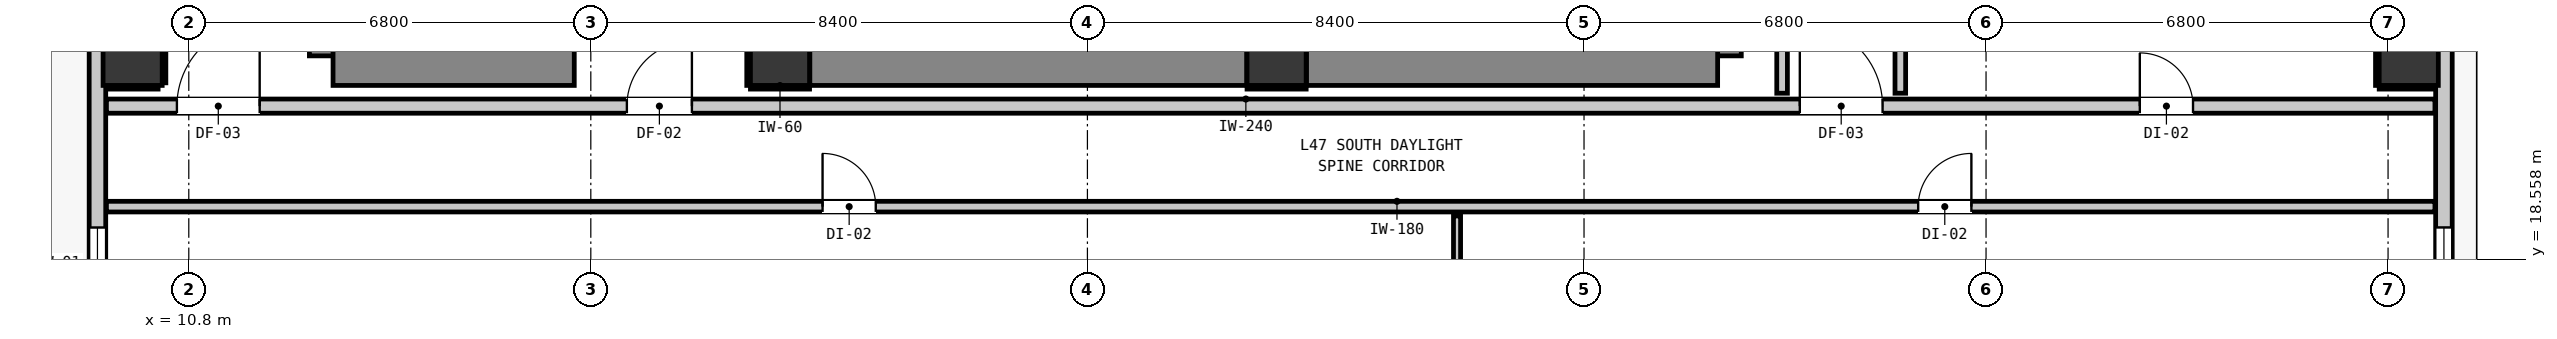
"""IFC4 building model, lengths in metres.
Left out: names, types, materials, properties, quantities, classifications, styles, units other than length and angle.
Written with IfcOpenShell. Run it as: python <this file> out.ifc"""

import sys

from ifc_helpers import new_model, si_unit, direction, frame, frame_2d, origin, origin_2d, place, context, subcontext, project, spatial, rectangle, extrude, element, fill, save


model = new_model("IFC4")
c1 = context("Model", 3, precision=1e-05, world=origin(), true_north=direction((0.0, 1.0)))
c2 = subcontext(c1, "Body", "Model", "MODEL_VIEW")
j1 = project(units=[si_unit("LENGTHUNIT", "METRE"), si_unit("PLANEANGLEUNIT", "RADIAN")], contexts=[c1])
p1 = place(None, origin())
s1 = spatial("IfcSite", under=j1, at=p1, CompositionType="ELEMENT")
p2 = place(p1, origin())
s2 = spatial("IfcBuilding", under=s1, at=p2, CompositionType="ELEMENT")
p3 = place(p2, frame((0.0, 0.0, 162.52)))
s3 = spatial("IfcBuildingStorey", under=s2, at=p3, CompositionType="ELEMENT", Elevation=162.52)
for number, where, z_axis, x_axis in (
    (1, (20.8, 22.0, 0.0), (0.0, 0.0, 1.0), (1.0, 0.0, 0.0)),
    (2, (29.2, 22.0, 0.0), (0.0, 0.0, 1.0), (1.0, 0.0, 0.0)),
):
    element("IfcColumn", number, at=place(p3, frame(where, z_axis=z_axis, x_axis=x_axis)), inside=s3, PredefinedType="COLUMN", context=c2, shape_type="SweptSolid", body=[
        extrude(rectangle(XDim=1.0, YDim=1.0, at=origin_2d()), origin(), (0.0, 0.0, 1.0), 3.32),
    ])
p4 = place(p3, frame((13.34, 22.0, 0.0), z_axis=(0.0, 0.0, 1.0), x_axis=(0.0, 1.0, 0.0)))
e3 = element("IfcWall", 3, at=p4, inside=s3, PredefinedType="SHEAR", context=c2, shape_type="SweptSolid", body=[
    extrude(rectangle(XDim=8.195, YDim=1.0, at=frame_2d((4.098, 0.0))), origin(), (0.0, 0.0, 1.0), 3.32),
])
p5 = place(p3, frame((13.24, 22.0, 0.0), z_axis=(0.0, 0.0, 1.0), x_axis=(1.0, 0.0, 0.0)))
e4 = element("IfcWall", 4, at=p5, inside=s3, PredefinedType="SHEAR", context=c2, shape_type="SweptSolid", body=[
    extrude(rectangle(XDim=4.08, YDim=1.0, at=frame_2d((2.04, 0.0))), origin(), (0.0, 0.0, 1.0), 3.32),
])
p6 = place(p3, frame((36.56, 22.0, 0.0), z_axis=(0.0, 0.0, 1.0), x_axis=(0.0, 1.0, 0.0)))
e5 = element("IfcWall", 5, at=p6, inside=s3, PredefinedType="SHEAR", context=c2, shape_type="SweptSolid", body=[
    extrude(rectangle(XDim=8.195, YDim=1.0, at=frame_2d((4.098, 0.0))), origin(), (0.0, 0.0, 1.0), 3.32),
])
p7 = place(p3, frame((29.705, 22.0, 0.0), z_axis=(0.0, 0.0, 1.0), x_axis=(1.0, 0.0, 0.0)))
e6 = element("IfcWall", 6, at=p7, inside=s3, PredefinedType="SHEAR", context=c2, shape_type="SweptSolid", body=[
    extrude(rectangle(XDim=6.955, YDim=1.0, at=frame_2d((3.478, 0.0))), origin(), (0.0, 0.0, 1.0), 3.32),
])
p8 = place(p3, frame((21.305, 22.0, 0.0), z_axis=(0.0, 0.0, 1.0), x_axis=(1.0, 0.0, 0.0)))
e7 = element("IfcWall", 7, at=p8, inside=s3, PredefinedType="SHEAR", context=c2, shape_type="SweptSolid", body=[
    extrude(rectangle(XDim=7.39, YDim=1.0, at=frame_2d((3.695, 0.0))), origin(), (0.0, 0.0, 1.0), 3.32),
])
for number, where, z_axis, x_axis in (
    (8, (9.85, 22.0, 0.0), (0.0, 0.0, 1.0), (1.0, 0.0, 0.0)),
    (9, (48.35, 22.0, 0.0), (0.0, 0.0, 1.0), (1.0, 0.0, 0.0)),
):
    element("IfcColumn", number, at=place(p3, frame(where, z_axis=z_axis, x_axis=x_axis)), inside=s3, PredefinedType="COLUMN", context=c2, shape_type="SweptSolid", body=[
        extrude(rectangle(XDim=1.0, YDim=1.0, at=origin_2d()), origin(), (0.0, 0.0, 1.0), 2.9),
    ])
p9 = place(p3, frame((9.255, 17.555, 0.0), z_axis=(0.0, 0.0, 1.0), x_axis=(0.0, 1.0, 0.0)))
e10 = element("IfcWall", 10, at=p9, inside=s3, PredefinedType="STANDARD", context=c2, shape_type="SweptSolid", body=[
    extrude(rectangle(XDim=32.29, YDim=0.28, at=frame_2d((16.145, 0.0))), origin(), (0.0, 0.0, 1.0), 2.9),
])
p10 = place(p9, frame((5.467, 0.0, 0.0)))
e11 = element("IfcOpeningElement", 11, at=p10, cuts=e10, PredefinedType="OPENING", context=c2, shape_type="SweptSolid", body=[
    extrude(rectangle(XDim=1.0, YDim=2.15, at=frame_2d((0.5, 1.075))), frame((0.0, 0.15, 0.0), z_axis=(0.0, -1.0, 0.0), x_axis=(1.0, 0.0, 0.0)), (0.0, 0.0, 1.0), 0.3),
])
p11 = place(p9, frame((0.342, 0.0, 0.85)))
e12 = element("IfcOpeningElement", 12, at=p11, cuts=e10, PredefinedType="OPENING", context=c2, shape_type="SweptSolid", body=[
    extrude(rectangle(XDim=1.2, YDim=1.8, at=frame_2d((0.6, 0.9))), frame((0.0, 0.15, 0.0), z_axis=(0.0, -1.0, 0.0), x_axis=(1.0, 0.0, 0.0)), (0.0, 0.0, 1.0), 0.3),
])
p12 = place(p9, frame((30.677, 0.0, 0.85)))
e13 = element("IfcOpeningElement", 13, at=p12, cuts=e10, PredefinedType="OPENING", context=c2, shape_type="SweptSolid", body=[
    extrude(rectangle(XDim=1.2, YDim=1.8, at=frame_2d((0.6, 0.9))), frame((0.0, 0.15, 0.0), z_axis=(0.0, -1.0, 0.0), x_axis=(1.0, 0.0, 0.0)), (0.0, 0.0, 1.0), 0.3),
])
p13 = place(p3, frame((48.945, 49.845, 0.0), z_axis=(0.0, 0.0, 1.0), x_axis=(0.0, -1.0, 0.0)))
e14 = element("IfcWall", 14, at=p13, inside=s3, PredefinedType="STANDARD", context=c2, shape_type="SweptSolid", body=[
    extrude(rectangle(XDim=32.29, YDim=0.28, at=frame_2d((16.145, 0.0))), origin(), (0.0, 0.0, 1.0), 2.9),
])
p14 = place(p13, frame((2.659, 0.0, 0.0)))
e15 = element("IfcOpeningElement", 15, at=p14, cuts=e14, PredefinedType="OPENING", context=c2, shape_type="SweptSolid", body=[
    extrude(rectangle(XDim=1.0, YDim=2.15, at=frame_2d((0.5, 1.075))), frame((0.0, 0.15, 0.0), z_axis=(0.0, -1.0, 0.0), x_axis=(1.0, 0.0, 0.0)), (0.0, 0.0, 1.0), 0.3),
])
p15 = place(p13, frame((30.747, 0.0, 0.85)))
e16 = element("IfcOpeningElement", 16, at=p15, cuts=e14, PredefinedType="OPENING", context=c2, shape_type="SweptSolid", body=[
    extrude(rectangle(XDim=1.2, YDim=1.8, at=frame_2d((0.6, 0.9))), frame((0.0, 0.15, 0.0), z_axis=(0.0, -1.0, 0.0), x_axis=(1.0, 0.0, 0.0)), (0.0, 0.0, 1.0), 0.3),
])
p16 = place(p13, frame((4.027, 0.0, 0.85)))
e17 = element("IfcOpeningElement", 17, at=p16, cuts=e14, PredefinedType="OPENING", context=c2, shape_type="SweptSolid", body=[
    extrude(rectangle(XDim=0.9, YDim=1.5, at=frame_2d((0.45, 0.75))), frame((0.0, 0.15, 0.0), z_axis=(0.0, -1.0, 0.0), x_axis=(1.0, 0.0, 0.0)), (0.0, 0.0, 1.0), 0.3),
])
p17 = place(p13, frame((0.412, 0.0, 0.85)))
e18 = element("IfcOpeningElement", 18, at=p17, cuts=e14, PredefinedType="OPENING", context=c2, shape_type="SweptSolid", body=[
    extrude(rectangle(XDim=1.2, YDim=1.8, at=frame_2d((0.6, 0.9))), frame((0.0, 0.15, 0.0), z_axis=(0.0, -1.0, 0.0), x_axis=(1.0, 0.0, 0.0)), (0.0, 0.0, 1.0), 0.3),
])
p18 = place(p13, frame((22.895, 0.0, 0.85)))
e19 = element("IfcOpeningElement", 19, at=p18, cuts=e14, PredefinedType="OPENING", context=c2, shape_type="SweptSolid", body=[
    extrude(rectangle(XDim=1.2, YDim=1.8, at=frame_2d((0.6, 0.9))), frame((0.0, 0.15, 0.0), z_axis=(0.0, -1.0, 0.0), x_axis=(1.0, 0.0, 0.0)), (0.0, 0.0, 1.0), 0.3),
])
p19 = place(p3, frame((9.407, 21.15, 0.0), z_axis=(0.0, 0.0, 1.0), x_axis=(1.0, 0.0, 0.0)))
e20 = element("IfcWall", 20, at=p19, inside=s3, PredefinedType="PARTITIONING", context=c2, shape_type="SweptSolid", body=[
    extrude(rectangle(XDim=39.386, YDim=0.24, at=frame_2d((19.693, 0.0))), origin(), (0.0, 0.0, 1.0), 2.9),
])
p20 = place(p19, frame((8.803, 0.0, 0.0)))
e21 = element("IfcOpeningElement", 21, at=p20, cuts=e20, PredefinedType="OPENING", context=c2, shape_type="SweptSolid", body=[
    extrude(rectangle(XDim=1.1, YDim=2.15, at=frame_2d((0.55, 1.075))), frame((0.0, 0.13, 0.0), z_axis=(0.0, -1.0, 0.0), x_axis=(1.0, 0.0, 0.0)), (0.0, 0.0, 1.0), 0.26),
])
p21 = place(p19, frame((1.192, 0.0, 0.0)))
e22 = element("IfcOpeningElement", 22, at=p21, cuts=e20, PredefinedType="OPENING", context=c2, shape_type="SweptSolid", body=[
    extrude(rectangle(XDim=1.4, YDim=2.15, at=frame_2d((0.7, 1.075))), frame((0.0, 0.13, 0.0), z_axis=(0.0, -1.0, 0.0), x_axis=(1.0, 0.0, 0.0)), (0.0, 0.0, 1.0), 0.26),
])
p22 = place(p19, frame((28.643, 0.0, 0.0)))
e23 = element("IfcOpeningElement", 23, at=p22, cuts=e20, PredefinedType="OPENING", context=c2, shape_type="SweptSolid", body=[
    extrude(rectangle(XDim=1.4, YDim=2.15, at=frame_2d((0.7, 1.075))), frame((0.0, 0.13, 0.0), z_axis=(0.0, -1.0, 0.0), x_axis=(1.0, 0.0, 0.0)), (0.0, 0.0, 1.0), 0.26),
])
p23 = place(p19, frame((34.394, 0.0, 0.0)))
e24 = element("IfcOpeningElement", 24, at=p23, cuts=e20, PredefinedType="OPENING", context=c2, shape_type="SweptSolid", body=[
    extrude(rectangle(XDim=0.9, YDim=2.1, at=frame_2d((0.45, 1.05))), frame((0.0, 0.13, 0.0), z_axis=(0.0, -1.0, 0.0), x_axis=(1.0, 0.0, 0.0)), (0.0, 0.0, 1.0), 0.26),
])
p24 = place(p3, frame((9.407, 19.45, 0.0), z_axis=(0.0, 0.0, 1.0), x_axis=(1.0, 0.0, 0.0)))
e25 = element("IfcWall", 25, at=p24, inside=s3, PredefinedType="PARTITIONING", context=c2, shape_type="SweptSolid", body=[
    extrude(rectangle(XDim=39.386, YDim=0.18, at=frame_2d((19.693, 0.0))), origin(), (0.0, 0.0, 1.0), 2.9),
])
p25 = place(p24, frame((12.113, 0.0, 0.0)))
e26 = element("IfcOpeningElement", 26, at=p25, cuts=e25, PredefinedType="OPENING", context=c2, shape_type="SweptSolid", body=[
    extrude(rectangle(XDim=0.9, YDim=2.1, at=frame_2d((0.45, 1.05))), frame((0.0, 0.1, 0.0), z_axis=(0.0, -1.0, 0.0), x_axis=(1.0, 0.0, 0.0)), (0.0, 0.0, 1.0), 0.2),
])
p26 = place(p24, frame((30.645, 0.0, 0.0)))
e27 = element("IfcOpeningElement", 27, at=p26, cuts=e25, PredefinedType="OPENING", context=c2, shape_type="SweptSolid", body=[
    extrude(rectangle(XDim=0.9, YDim=2.1, at=frame_2d((0.45, 1.05))), frame((0.0, 0.1, 0.0), z_axis=(0.0, -1.0, 0.0), x_axis=(1.0, 0.0, 0.0)), (0.0, 0.0, 1.0), 0.2),
])
p27 = place(p3, frame((37.75, 21.368, 0.0), z_axis=(0.0, 0.0, 1.0), x_axis=(0.0, 1.0, 0.0)))
e28 = element("IfcWall", 28, at=p27, inside=s3, PredefinedType="PARTITIONING", context=c2, shape_type="SweptSolid", body=[
    extrude(rectangle(XDim=18.694, YDim=0.18, at=frame_2d((9.347, 0.0))), origin(), (0.0, 0.0, 1.0), 2.9),
])
p28 = place(p3, frame((39.75, 21.368, 0.0), z_axis=(0.0, 0.0, 1.0), x_axis=(0.0, 1.0, 0.0)))
e29 = element("IfcWall", 29, at=p28, inside=s3, PredefinedType="PARTITIONING", context=c2, shape_type="SweptSolid", body=[
    extrude(rectangle(XDim=12.464, YDim=0.18, at=frame_2d((6.232, 0.0))), origin(), (0.0, 0.0, 1.0), 2.9),
])
p29 = place(p3, frame((32.252, 15.407, 0.0), z_axis=(0.0, 0.0, 1.0), x_axis=(0.0, 1.0, 0.0)))
e30 = element("IfcWall", 30, at=p29, inside=s3, PredefinedType="PARTITIONING", context=c2, shape_type="SweptSolid", body=[
    extrude(rectangle(XDim=3.885, YDim=0.12, at=frame_2d((1.942, 0.0))), origin(), (0.0, 0.0, 1.0), 2.9),
])
for number, where, z_axis, x_axis in (
    (31, (20.3, 21.468, 0.0), (0.0, 0.0, 1.0), (1.0, 0.0, 0.0)),
    (32, (20.268, 21.5, 0.0), (0.0, 0.0, 1.0), (0.0, 1.0, 0.0)),
    (33, (28.7, 21.468, 0.0), (0.0, 0.0, 1.0), (1.0, 0.0, 0.0)),
):
    element("IfcWall", number, at=place(p3, frame(where, z_axis=z_axis, x_axis=x_axis)), inside=s3, PredefinedType="PARTITIONING", context=c2, shape_type="SweptSolid", body=[
        extrude(rectangle(XDim=1.0, YDim=0.06, at=frame_2d((0.5, 0.0))), origin(), (0.0, 0.0, 1.0), 0.905),
    ])
p30 = place(p3, frame((9.41, 21.468, 0.0), z_axis=(0.0, 0.0, 1.0), x_axis=(1.0, 0.0, 0.0)))
e34 = element("IfcWall", 34, at=p30, inside=s3, PredefinedType="PARTITIONING", context=c2, shape_type="SweptSolid", body=[
    extrude(rectangle(XDim=0.871, YDim=0.06, at=frame_2d((0.436, 0.0))), origin(), (0.0, 0.0, 1.0), 0.905),
])
p31 = place(p3, frame((10.382, 21.544, 0.0), z_axis=(0.0, 0.0, 1.0), x_axis=(0.0, 1.0, 0.0)))
e35 = element("IfcWall", 35, at=p31, inside=s3, PredefinedType="PARTITIONING", context=c2, shape_type="SweptSolid", body=[
    extrude(rectangle(XDim=0.956, YDim=0.06, at=frame_2d((0.478, 0.0))), origin(), (0.0, 0.0, 1.0), 1.45),
])
p32 = place(p3, frame((47.85, 21.468, 0.0), z_axis=(0.0, 0.0, 1.0), x_axis=(1.0, 0.0, 0.0)))
e36 = element("IfcWall", 36, at=p32, inside=s3, PredefinedType="PARTITIONING", context=c2, shape_type="SweptSolid", body=[
    extrude(rectangle(XDim=0.94, YDim=0.06, at=frame_2d((0.47, 0.0))), origin(), (0.0, 0.0, 1.0), 0.905),
])
p33 = place(p3, frame((47.818, 21.5, 0.0), z_axis=(0.0, 0.0, 1.0), x_axis=(0.0, 1.0, 0.0)))
e37 = element("IfcWall", 37, at=p33, inside=s3, PredefinedType="PARTITIONING", context=c2, shape_type="SweptSolid", body=[
    extrude(rectangle(XDim=1.0, YDim=0.06, at=frame_2d((0.5, 0.0))), origin(), (0.0, 0.0, 1.0), 1.45),
])
p34 = place(p11, origin())
e38 = element("IfcWindow", 38, at=p34, inside=s3, PartitioningType="SINGLE_PANEL", PredefinedType="WINDOW", context=c2, shape_type="SweptSolid", body=[
    extrude(rectangle(XDim=1.2, YDim=1.8, at=frame_2d((0.6, 0.9))), frame((0.0, 0.03, 0.0), z_axis=(0.0, -1.0, 0.0), x_axis=(1.0, 0.0, 0.0)), (0.0, 0.0, 1.0), 0.06),
])
fill(e12, e38)
p35 = place(p15, origin())
e39 = element("IfcWindow", 39, at=p35, inside=s3, PartitioningType="SINGLE_PANEL", PredefinedType="WINDOW", context=c2, shape_type="SweptSolid", body=[
    extrude(rectangle(XDim=1.2, YDim=1.8, at=frame_2d((0.6, 0.9))), frame((0.0, 0.03, 0.0), z_axis=(0.0, -1.0, 0.0), x_axis=(1.0, 0.0, 0.0)), (0.0, 0.0, 1.0), 0.06),
])
fill(e16, e39)
p36 = place(p20, origin())
e40 = element("IfcDoor", 40, at=p36, inside=s3, OperationType="SINGLE_SWING_RIGHT", PredefinedType="DOOR", context=c2, shape_type="SweptSolid", body=[
    extrude(rectangle(XDim=1.1, YDim=2.15, at=frame_2d((0.55, 1.075))), frame((0.0, 0.025, 0.0), z_axis=(0.0, -1.0, 0.0), x_axis=(1.0, 0.0, 0.0)), (0.0, 0.0, 1.0), 0.05),
])
fill(e21, e40)
p37 = place(p21, origin())
e41 = element("IfcDoor", 41, at=p37, inside=s3, OperationType="SINGLE_SWING_RIGHT", PredefinedType="DOOR", context=c2, shape_type="SweptSolid", body=[
    extrude(rectangle(XDim=1.4, YDim=2.15, at=frame_2d((0.7, 1.075))), frame((0.0, 0.025, 0.0), z_axis=(0.0, -1.0, 0.0), x_axis=(1.0, 0.0, 0.0)), (0.0, 0.0, 1.0), 0.05),
])
fill(e22, e41)
p38 = place(p22, origin())
e42 = element("IfcDoor", 42, at=p38, inside=s3, OperationType="SINGLE_SWING_LEFT", PredefinedType="DOOR", context=c2, shape_type="SweptSolid", body=[
    extrude(rectangle(XDim=1.4, YDim=2.15, at=frame_2d((0.7, 1.075))), frame((0.0, 0.025, 0.0), z_axis=(0.0, -1.0, 0.0), x_axis=(1.0, 0.0, 0.0)), (0.0, 0.0, 1.0), 0.05),
])
fill(e23, e42)
p39 = place(p25, origin())
e43 = element("IfcDoor", 43, at=p39, inside=s3, OperationType="SINGLE_SWING_LEFT", PredefinedType="DOOR", context=c2, shape_type="SweptSolid", body=[
    extrude(rectangle(XDim=0.9, YDim=2.1, at=frame_2d((0.45, 1.05))), frame((0.0, 0.025, 0.0), z_axis=(0.0, -1.0, 0.0), x_axis=(1.0, 0.0, 0.0)), (0.0, 0.0, 1.0), 0.05),
])
fill(e26, e43)
p40 = place(p26, origin())
e44 = element("IfcDoor", 44, at=p40, inside=s3, OperationType="SINGLE_SWING_RIGHT", PredefinedType="DOOR", context=c2, shape_type="SweptSolid", body=[
    extrude(rectangle(XDim=0.9, YDim=2.1, at=frame_2d((0.45, 1.05))), frame((0.0, 0.025, 0.0), z_axis=(0.0, -1.0, 0.0), x_axis=(1.0, 0.0, 0.0)), (0.0, 0.0, 1.0), 0.05),
])
fill(e27, e44)
p41 = place(p23, origin())
e45 = element("IfcDoor", 45, at=p41, inside=s3, OperationType="SINGLE_SWING_LEFT", PredefinedType="DOOR", context=c2, shape_type="SweptSolid", body=[
    extrude(rectangle(XDim=0.9, YDim=2.1, at=frame_2d((0.45, 1.05))), frame((0.0, 0.025, 0.0), z_axis=(0.0, -1.0, 0.0), x_axis=(1.0, 0.0, 0.0)), (0.0, 0.0, 1.0), 0.05),
])
fill(e24, e45)
save(model, sys.argv[1])
